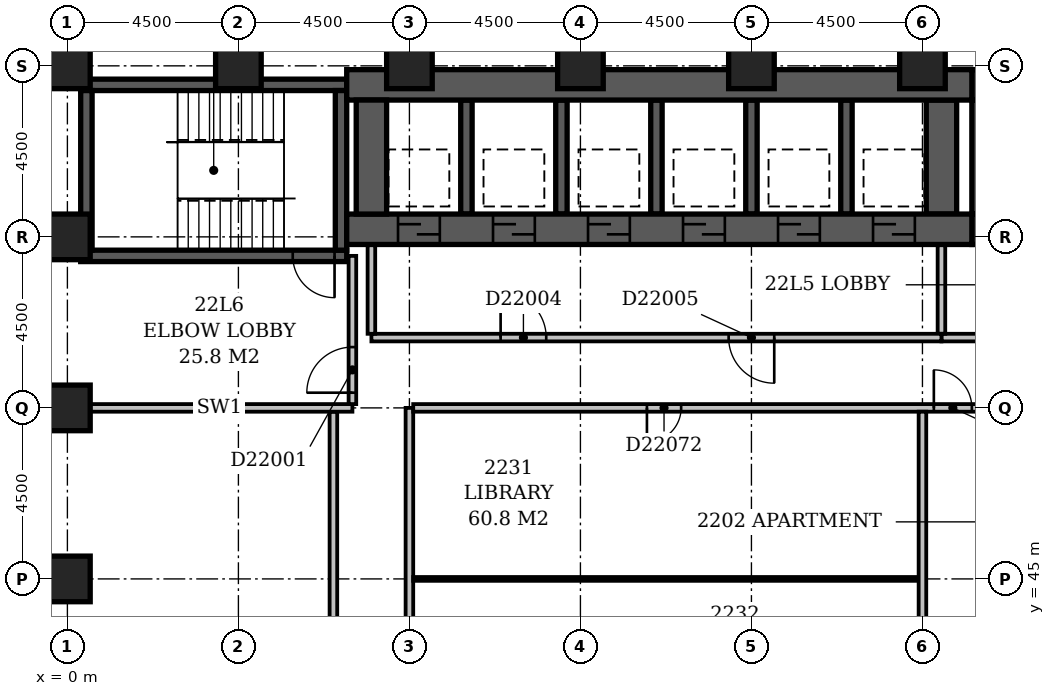
"""IFC4 building model, lengths in metres.
Left out: names, types, materials, properties, quantities, classifications, styles, units other than length and angle.
Written with IfcOpenShell. Run it as: python <this file> out.ifc"""

import sys

from ifc_helpers import new_model, si_unit, direction, frame, frame_2d, origin, origin_2d, place, context, subcontext, project, spatial, rectangle, extrude, element, fill, save


model = new_model("IFC4")
c1 = context("Model", 3, precision=1e-05, world=origin(), true_north=direction((0.0, 1.0)))
c2 = subcontext(c1, "Body", "Model", "MODEL_VIEW")
j1 = project(units=[si_unit("LENGTHUNIT", "METRE"), si_unit("PLANEANGLEUNIT", "RADIAN")], contexts=[c1])
p1 = place(None, origin())
s1 = spatial("IfcSite", under=j1, at=p1, CompositionType="ELEMENT")
p2 = place(p1, origin())
s2 = spatial("IfcBuilding", under=s1, at=p2, CompositionType="ELEMENT")
p3 = place(p2, frame((0.0, 0.0, 90.2)))
s3 = spatial("IfcBuildingStorey", under=s2, at=p3, CompositionType="ELEMENT", Elevation=90.2)
p4 = place(p3, frame((0.35, 53.5, -0.3), z_axis=(0.0, 0.0, 1.0), x_axis=(1.0, 0.0, 0.0)))
e1 = element("IfcWall", 1, at=p4, inside=s3, PredefinedType="SHEAR", context=c2, shape_type="SweptSolid", body=[
    extrude(rectangle(XDim=7.0, YDim=0.3, at=frame_2d((3.5, 0.0))), origin(), (0.0, 0.0, 1.0), 3.6),
])
p5 = place(p4, frame((5.58, 0.0, 0.3)))
e2 = element("IfcOpeningElement", 2, at=p5, cuts=e1, PredefinedType="OPENING", context=c2, shape_type="SweptSolid", body=[
    extrude(rectangle(XDim=1.1, YDim=2.1, at=frame_2d((0.55, 1.05))), frame((0.0, 0.162, 0.0), z_axis=(0.0, -1.0, 0.0), x_axis=(1.0, 0.0, 0.0)), (0.0, 0.0, 1.0), 0.324),
])
p6 = place(p3, frame((0.35, 58.0, -0.3), z_axis=(0.0, 0.0, 1.0), x_axis=(1.0, 0.0, 0.0)))
e3 = element("IfcWall", 3, at=p6, inside=s3, PredefinedType="SHEAR", context=c2, shape_type="SweptSolid", body=[
    extrude(rectangle(XDim=7.0, YDim=0.3, at=frame_2d((3.5, 0.0))), origin(), (0.0, 0.0, 1.0), 3.6),
])
for number, where, z_axis, x_axis in (
    (4, (0.5, 53.65, -0.3), (0.0, 0.0, 1.0), (0.0, 1.0, 0.0)),
    (5, (7.2, 53.65, -0.3), (0.0, 0.0, 1.0), (0.0, 1.0, 0.0)),
):
    element("IfcWall", number, at=place(p3, frame(where, z_axis=z_axis, x_axis=x_axis)), inside=s3, PredefinedType="SHEAR", context=c2, shape_type="SweptSolid", body=[
        extrude(rectangle(XDim=4.2, YDim=0.3, at=frame_2d((2.1, 0.0))), origin(), (0.0, 0.0, 1.0), 3.6),
    ])
p7 = place(p3, frame((7.35, 54.2, -0.3), z_axis=(0.0, 0.0, 1.0), x_axis=(1.0, 0.0, 0.0)))
e6 = element("IfcWall", 6, at=p7, inside=s3, PredefinedType="SHEAR", context=c2, shape_type="SweptSolid", body=[
    extrude(rectangle(XDim=16.45, YDim=0.8, at=frame_2d((8.225, 0.0))), origin(), (0.0, 0.0, 1.0), 3.6),
])
p8 = place(p7, frame((1.35, 0.0, 0.3)))
e7 = element("IfcOpeningElement", 7, at=p8, cuts=e6, PredefinedType="OPENING", context=c2, shape_type="SweptSolid", body=[
    extrude(rectangle(XDim=1.1, YDim=2.1, at=frame_2d((0.55, 1.05))), frame((0.0, 0.412, 0.0), z_axis=(0.0, -1.0, 0.0), x_axis=(1.0, 0.0, 0.0)), (0.0, 0.0, 1.0), 0.824),
])
p9 = place(p7, frame((3.85, 0.0, 0.3)))
e8 = element("IfcOpeningElement", 8, at=p9, cuts=e6, PredefinedType="OPENING", context=c2, shape_type="SweptSolid", body=[
    extrude(rectangle(XDim=1.1, YDim=2.1, at=frame_2d((0.55, 1.05))), frame((0.0, 0.412, 0.0), z_axis=(0.0, -1.0, 0.0), x_axis=(1.0, 0.0, 0.0)), (0.0, 0.0, 1.0), 0.824),
])
p10 = place(p7, frame((6.35, 0.0, 0.3)))
e9 = element("IfcOpeningElement", 9, at=p10, cuts=e6, PredefinedType="OPENING", context=c2, shape_type="SweptSolid", body=[
    extrude(rectangle(XDim=1.1, YDim=2.1, at=frame_2d((0.55, 1.05))), frame((0.0, 0.412, 0.0), z_axis=(0.0, -1.0, 0.0), x_axis=(1.0, 0.0, 0.0)), (0.0, 0.0, 1.0), 0.824),
])
p11 = place(p7, frame((8.85, 0.0, 0.3)))
e10 = element("IfcOpeningElement", 10, at=p11, cuts=e6, PredefinedType="OPENING", context=c2, shape_type="SweptSolid", body=[
    extrude(rectangle(XDim=1.1, YDim=2.1, at=frame_2d((0.55, 1.05))), frame((0.0, 0.412, 0.0), z_axis=(0.0, -1.0, 0.0), x_axis=(1.0, 0.0, 0.0)), (0.0, 0.0, 1.0), 0.824),
])
p12 = place(p7, frame((11.35, 0.0, 0.3)))
e11 = element("IfcOpeningElement", 11, at=p12, cuts=e6, PredefinedType="OPENING", context=c2, shape_type="SweptSolid", body=[
    extrude(rectangle(XDim=1.1, YDim=2.1, at=frame_2d((0.55, 1.05))), frame((0.0, 0.412, 0.0), z_axis=(0.0, -1.0, 0.0), x_axis=(1.0, 0.0, 0.0)), (0.0, 0.0, 1.0), 0.824),
])
p13 = place(p7, frame((13.85, 0.0, 0.3)))
e12 = element("IfcOpeningElement", 12, at=p13, cuts=e6, PredefinedType="OPENING", context=c2, shape_type="SweptSolid", body=[
    extrude(rectangle(XDim=1.1, YDim=2.1, at=frame_2d((0.55, 1.05))), frame((0.0, 0.412, 0.0), z_axis=(0.0, -1.0, 0.0), x_axis=(1.0, 0.0, 0.0)), (0.0, 0.0, 1.0), 0.824),
])
p14 = place(p3, frame((7.35, 58.0, -0.3), z_axis=(0.0, 0.0, 1.0), x_axis=(1.0, 0.0, 0.0)))
e13 = element("IfcWall", 13, at=p14, inside=s3, PredefinedType="SHEAR", context=c2, shape_type="SweptSolid", body=[
    extrude(rectangle(XDim=16.45, YDim=0.8, at=frame_2d((8.225, 0.0))), origin(), (0.0, 0.0, 1.0), 3.6),
])
p15 = place(p3, frame((8.0, 54.6, -0.3), z_axis=(0.0, 0.0, 1.0), x_axis=(0.0, 1.0, 0.0)))
e14 = element("IfcWall", 14, at=p15, inside=s3, PredefinedType="SHEAR", context=c2, shape_type="SweptSolid", body=[
    extrude(rectangle(XDim=3.0, YDim=0.8, at=frame_2d((1.5, 0.0))), origin(), (0.0, 0.0, 1.0), 3.6),
])
for number, where, z_axis, x_axis in (
    (15, (10.5, 54.6, -0.3), (0.0, 0.0, 1.0), (0.0, 1.0, 0.0)),
    (16, (13.0, 54.6, -0.3), (0.0, 0.0, 1.0), (0.0, 1.0, 0.0)),
    (17, (15.5, 54.6, -0.3), (0.0, 0.0, 1.0), (0.0, 1.0, 0.0)),
    (18, (18.0, 54.6, -0.3), (0.0, 0.0, 1.0), (0.0, 1.0, 0.0)),
    (19, (20.5, 54.6, -0.3), (0.0, 0.0, 1.0), (0.0, 1.0, 0.0)),
):
    element("IfcWall", number, at=place(p3, frame(where, z_axis=z_axis, x_axis=x_axis)), inside=s3, PredefinedType="SHEAR", context=c2, shape_type="SweptSolid", body=[
        extrude(rectangle(XDim=3.0, YDim=0.3, at=frame_2d((1.5, 0.0))), origin(), (0.0, 0.0, 1.0), 3.6),
    ])
p16 = place(p3, frame((23.0, 54.6, -0.3), z_axis=(0.0, 0.0, 1.0), x_axis=(0.0, 1.0, 0.0)))
e20 = element("IfcWall", 20, at=p16, inside=s3, PredefinedType="SHEAR", context=c2, shape_type="SweptSolid", body=[
    extrude(rectangle(XDim=3.0, YDim=0.8, at=frame_2d((1.5, 0.0))), origin(), (0.0, 0.0, 1.0), 3.6),
])
p17 = place(p3, frame((23.8, 54.2, -0.3), z_axis=(0.0, 0.0, 1.0), x_axis=(1.0, 0.0, 0.0)))
e21 = element("IfcWall", 21, at=p17, inside=s3, PredefinedType="SHEAR", context=c2, shape_type="SweptSolid", body=[
    extrude(rectangle(XDim=3.3, YDim=0.8, at=frame_2d((1.65, 0.0))), origin(), (0.0, 0.0, 1.0), 3.6),
])
p18 = place(p17, frame((1.1, 0.0, 0.3)))
e22 = element("IfcOpeningElement", 22, at=p18, cuts=e21, PredefinedType="OPENING", context=c2, shape_type="SweptSolid", body=[
    extrude(rectangle(XDim=1.1, YDim=2.1, at=frame_2d((0.55, 1.05))), frame((0.0, 0.412, 0.0), z_axis=(0.0, -1.0, 0.0), x_axis=(1.0, 0.0, 0.0)), (0.0, 0.0, 1.0), 0.824),
])
p19 = place(p3, frame((23.8, 58.0, -0.3), z_axis=(0.0, 0.0, 1.0), x_axis=(1.0, 0.0, 0.0)))
e23 = element("IfcWall", 23, at=p19, inside=s3, PredefinedType="SHEAR", context=c2, shape_type="SweptSolid", body=[
    extrude(rectangle(XDim=3.3, YDim=0.8, at=frame_2d((1.65, 0.0))), origin(), (0.0, 0.0, 1.0), 3.6),
])
p20 = place(p3, frame((24.2, 54.6, -0.3), z_axis=(0.0, 0.0, 1.0), x_axis=(0.0, 1.0, 0.0)))
e24 = element("IfcWall", 24, at=p20, inside=s3, PredefinedType="SHEAR", context=c2, shape_type="SweptSolid", body=[
    extrude(rectangle(XDim=3.0, YDim=0.8, at=frame_2d((1.5, 0.0))), origin(), (0.0, 0.0, 1.0), 3.6),
])
for number, where, z_axis, x_axis in (
    (25, (0.0, 45.0, -0.3), (0.0, 0.0, 1.0), (1.0, 0.0, 0.0)),
    (26, (0.0, 49.5, -0.3), (0.0, 0.0, 1.0), (1.0, 0.0, 0.0)),
    (27, (0.0, 54.0, -0.3), (0.0, 0.0, 1.0), (1.0, 0.0, 0.0)),
    (28, (0.0, 58.5, -0.3), (0.0, 0.0, 1.0), (1.0, 0.0, 0.0)),
    (29, (4.5, 58.5, -0.3), (0.0, 0.0, 1.0), (1.0, 0.0, 0.0)),
    (30, (9.0, 58.5, -0.3), (0.0, 0.0, 1.0), (1.0, 0.0, 0.0)),
    (31, (13.5, 58.5, -0.3), (0.0, 0.0, 1.0), (1.0, 0.0, 0.0)),
    (32, (18.0, 58.5, -0.3), (0.0, 0.0, 1.0), (1.0, 0.0, 0.0)),
    (33, (22.5, 58.5, -0.3), (0.0, 0.0, 1.0), (1.0, 0.0, 0.0)),
):
    element("IfcColumn", number, at=place(p3, frame(where, z_axis=z_axis, x_axis=x_axis)), inside=s3, PredefinedType="COLUMN", context=c2, shape_type="SweptSolid", body=[
        extrude(rectangle(XDim=1.2, YDim=1.2, at=origin_2d()), origin(), (0.0, 0.0, 1.0), 3.6),
    ])
p21 = place(p3, frame((8.0, 51.35, 0.0), z_axis=(0.0, 0.0, 1.0), x_axis=(1.0, 0.0, 0.0)))
e34 = element("IfcWall", 34, at=p21, inside=s3, PredefinedType="PARTITIONING", context=c2, shape_type="SweptSolid", body=[
    extrude(rectangle(XDim=15.0, YDim=0.2, at=frame_2d((7.5, 0.0))), origin(), (0.0, 0.0, 1.0), 3.3),
])
p22 = place(p21, frame((3.4, 0.0, 0.0)))
e35 = element("IfcOpeningElement", 35, at=p22, cuts=e34, PredefinedType="OPENING", context=c2, shape_type="SweptSolid", body=[
    extrude(rectangle(XDim=1.2, YDim=2.1, at=frame_2d((0.6, 1.05))), frame((0.0, 0.112, 0.0), z_axis=(0.0, -1.0, 0.0), x_axis=(1.0, 0.0, 0.0)), (0.0, 0.0, 1.0), 0.224),
])
p23 = place(p21, frame((9.4, 0.0, 0.0)))
e36 = element("IfcOpeningElement", 36, at=p23, cuts=e34, PredefinedType="OPENING", context=c2, shape_type="SweptSolid", body=[
    extrude(rectangle(XDim=1.2, YDim=2.1, at=frame_2d((0.6, 1.05))), frame((0.0, 0.112, 0.0), z_axis=(0.0, -1.0, 0.0), x_axis=(1.0, 0.0, 0.0)), (0.0, 0.0, 1.0), 0.224),
])
for number, where, z_axis, x_axis in (
    (37, (23.0, 51.45, 0.0), (0.0, 0.0, 1.0), (0.0, 1.0, 0.0)),
    (38, (8.0, 51.45, 0.0), (0.0, 0.0, 1.0), (0.0, 1.0, 0.0)),
):
    element("IfcWall", number, at=place(p3, frame(where, z_axis=z_axis, x_axis=x_axis)), inside=s3, PredefinedType="PARTITIONING", context=c2, shape_type="SweptSolid", body=[
        extrude(rectangle(XDim=2.33, YDim=0.2, at=frame_2d((1.165, 0.0))), origin(), (0.0, 0.0, 1.0), 3.3),
    ])
p24 = place(p3, frame((23.0, 51.35, 0.0), z_axis=(0.0, 0.0, 1.0), x_axis=(1.0, 0.0, 0.0)))
e39 = element("IfcWall", 39, at=p24, inside=s3, PredefinedType="PARTITIONING", context=c2, shape_type="SweptSolid", body=[
    extrude(rectangle(XDim=4.8, YDim=0.2, at=frame_2d((2.4, 0.0))), origin(), (0.0, 0.0, 1.0), 3.3),
])
p25 = place(p24, frame((1.65, 0.0, 0.0)))
e40 = element("IfcOpeningElement", 40, at=p25, cuts=e39, PredefinedType="OPENING", context=c2, shape_type="SweptSolid", body=[
    extrude(rectangle(XDim=1.2, YDim=2.1, at=frame_2d((0.6, 1.05))), frame((0.0, 0.112, 0.0), z_axis=(0.0, -1.0, 0.0), x_axis=(1.0, 0.0, 0.0)), (0.0, 0.0, 1.0), 0.224),
])
p26 = place(p3, frame((0.5, 49.5, 0.0), z_axis=(0.0, 0.0, 1.0), x_axis=(1.0, 0.0, 0.0)))
e41 = element("IfcWall", 41, at=p26, inside=s3, PredefinedType="PARTITIONING", context=c2, shape_type="SweptSolid", body=[
    extrude(rectangle(XDim=7.0, YDim=0.2, at=frame_2d((3.5, 0.0))), origin(), (0.0, 0.0, 1.0), 3.3),
])
p27 = place(p3, frame((7.5, 49.6, 0.0), z_axis=(0.0, 0.0, 1.0), x_axis=(0.0, 1.0, 0.0)))
e42 = element("IfcWall", 42, at=p27, inside=s3, PredefinedType="PARTITIONING", context=c2, shape_type="SweptSolid", body=[
    extrude(rectangle(XDim=3.9, YDim=0.2, at=frame_2d((1.95, 0.0))), origin(), (0.0, 0.0, 1.0), 3.3),
])
p28 = place(p27, frame((0.3, 0.0, 0.0)))
e43 = element("IfcOpeningElement", 43, at=p28, cuts=e42, PredefinedType="OPENING", context=c2, shape_type="SweptSolid", body=[
    extrude(rectangle(XDim=1.2, YDim=2.1, at=frame_2d((0.6, 1.05))), frame((0.0, 0.112, 0.0), z_axis=(0.0, -1.0, 0.0), x_axis=(1.0, 0.0, 0.0)), (0.0, 0.0, 1.0), 0.224),
])
p29 = place(p3, frame((9.0, 5.0, 0.0), z_axis=(0.0, 0.0, 1.0), x_axis=(0.0, 1.0, 0.0)))
e44 = element("IfcWall", 44, at=p29, inside=s3, PredefinedType="PARTITIONING", context=c2, shape_type="SweptSolid", body=[
    extrude(rectangle(XDim=44.5, YDim=0.2, at=frame_2d((22.25, 0.0))), origin(), (0.0, 0.0, 1.0), 3.3),
])
p30 = place(p29, frame((28.45, 0.0, 0.0)))
e45 = element("IfcOpeningElement", 45, at=p30, cuts=e44, PredefinedType="OPENING", context=c2, shape_type="SweptSolid", body=[
    extrude(rectangle(XDim=1.0, YDim=2.1, at=frame_2d((0.5, 1.05))), frame((0.0, 0.112, 0.0), z_axis=(0.0, -1.0, 0.0), x_axis=(1.0, 0.0, 0.0)), (0.0, 0.0, 1.0), 0.224),
])
p31 = place(p29, frame((22.8, 0.0, 0.0)))
e46 = element("IfcOpeningElement", 46, at=p31, cuts=e44, PredefinedType="OPENING", context=c2, shape_type="SweptSolid", body=[
    extrude(rectangle(XDim=1.0, YDim=2.1, at=frame_2d((0.5, 1.05))), frame((0.0, 0.112, 0.0), z_axis=(0.0, -1.0, 0.0), x_axis=(1.0, 0.0, 0.0)), (0.0, 0.0, 1.0), 0.224),
])
p32 = place(p29, frame((14.55, 0.0, 0.0)))
e47 = element("IfcOpeningElement", 47, at=p32, cuts=e44, PredefinedType="OPENING", context=c2, shape_type="SweptSolid", body=[
    extrude(rectangle(XDim=1.0, YDim=2.1, at=frame_2d((0.5, 1.05))), frame((0.0, 0.112, 0.0), z_axis=(0.0, -1.0, 0.0), x_axis=(1.0, 0.0, 0.0)), (0.0, 0.0, 1.0), 0.224),
])
p33 = place(p29, frame((9.3, 0.0, 0.0)))
e48 = element("IfcOpeningElement", 48, at=p33, cuts=e44, PredefinedType="OPENING", context=c2, shape_type="SweptSolid", body=[
    extrude(rectangle(XDim=1.0, YDim=2.1, at=frame_2d((0.5, 1.05))), frame((0.0, 0.112, 0.0), z_axis=(0.0, -1.0, 0.0), x_axis=(1.0, 0.0, 0.0)), (0.0, 0.0, 1.0), 0.224),
])
p34 = place(p29, frame((35.0, 0.0, 0.0)))
e49 = element("IfcOpeningElement", 49, at=p34, cuts=e44, PredefinedType="OPENING", context=c2, shape_type="SweptSolid", body=[
    extrude(rectangle(XDim=0.9, YDim=2.1, at=frame_2d((0.45, 1.05))), frame((0.0, 0.112, 0.0), z_axis=(0.0, -1.0, 0.0), x_axis=(1.0, 0.0, 0.0)), (0.0, 0.0, 1.0), 0.224),
])
p35 = place(p29, frame((1.5, 0.0, 0.0)))
e50 = element("IfcOpeningElement", 50, at=p35, cuts=e44, PredefinedType="OPENING", context=c2, shape_type="SweptSolid", body=[
    extrude(rectangle(XDim=0.9, YDim=2.1, at=frame_2d((0.45, 1.05))), frame((0.0, 0.112, 0.0), z_axis=(0.0, -1.0, 0.0), x_axis=(1.0, 0.0, 0.0)), (0.0, 0.0, 1.0), 0.224),
])
p36 = place(p3, frame((7.0, 34.6, 0.0), z_axis=(0.0, 0.0, 1.0), x_axis=(0.0, 1.0, 0.0)))
e51 = element("IfcWall", 51, at=p36, inside=s3, PredefinedType="PARTITIONING", context=c2, shape_type="SweptSolid", body=[
    extrude(rectangle(XDim=14.8, YDim=0.2, at=frame_2d((7.4, 0.0))), origin(), (0.0, 0.0, 1.0), 3.3),
])
p37 = place(p36, frame((6.95, 0.0, 0.0)))
e52 = element("IfcOpeningElement", 52, at=p37, cuts=e51, PredefinedType="OPENING", context=c2, shape_type="SweptSolid", body=[
    extrude(rectangle(XDim=0.9, YDim=2.1, at=frame_2d((0.45, 1.05))), frame((0.0, 0.112, 0.0), z_axis=(0.0, -1.0, 0.0), x_axis=(1.0, 0.0, 0.0)), (0.0, 0.0, 1.0), 0.224),
])
p38 = place(p3, frame((22.5, 36.6, 0.0), z_axis=(0.0, 0.0, 1.0), x_axis=(0.0, 1.0, 0.0)))
e53 = element("IfcWall", 53, at=p38, inside=s3, PredefinedType="PARTITIONING", context=c2, shape_type="SweptSolid", body=[
    extrude(rectangle(XDim=12.8, YDim=0.2, at=frame_2d((6.4, 0.0))), origin(), (0.0, 0.0, 1.0), 3.3),
])
p39 = place(p3, frame((9.1, 45.0, 0.0), z_axis=(0.0, 0.0, 1.0), x_axis=(1.0, 0.0, 0.0)))
e54 = element("IfcWall", 54, at=p39, inside=s3, PredefinedType="PARTITIONING", context=c2, shape_type="SweptSolid", body=[
    extrude(rectangle(XDim=13.3, YDim=0.1, at=frame_2d((6.65, 0.0))), origin(), (0.0, 0.0, 1.0), 3.3),
])
p40 = place(p3, frame((9.1, 49.5, 0.0), z_axis=(0.0, 0.0, 1.0), x_axis=(1.0, 0.0, 0.0)))
e55 = element("IfcWall", 55, at=p40, inside=s3, PredefinedType="PARTITIONING", context=c2, shape_type="SweptSolid", body=[
    extrude(rectangle(XDim=57.8, YDim=0.2, at=frame_2d((28.9, 0.0))), origin(), (0.0, 0.0, 1.0), 3.3),
])
p41 = place(p40, frame((13.7, 0.0, 0.0)))
e56 = element("IfcOpeningElement", 56, at=p41, cuts=e55, PredefinedType="OPENING", context=c2, shape_type="SweptSolid", body=[
    extrude(rectangle(XDim=1.0, YDim=2.1, at=frame_2d((0.5, 1.05))), frame((0.0, 0.112, 0.0), z_axis=(0.0, -1.0, 0.0), x_axis=(1.0, 0.0, 0.0)), (0.0, 0.0, 1.0), 0.224),
])
p42 = place(p40, frame((22.7, 0.0, 0.0)))
e57 = element("IfcOpeningElement", 57, at=p42, cuts=e55, PredefinedType="OPENING", context=c2, shape_type="SweptSolid", body=[
    extrude(rectangle(XDim=1.0, YDim=2.1, at=frame_2d((0.5, 1.05))), frame((0.0, 0.112, 0.0), z_axis=(0.0, -1.0, 0.0), x_axis=(1.0, 0.0, 0.0)), (0.0, 0.0, 1.0), 0.224),
])
p43 = place(p40, frame((38.6, 0.0, 0.0)))
e58 = element("IfcOpeningElement", 58, at=p43, cuts=e55, PredefinedType="OPENING", context=c2, shape_type="SweptSolid", body=[
    extrude(rectangle(XDim=1.0, YDim=2.1, at=frame_2d((0.5, 1.05))), frame((0.0, 0.112, 0.0), z_axis=(0.0, -1.0, 0.0), x_axis=(1.0, 0.0, 0.0)), (0.0, 0.0, 1.0), 0.224),
])
p44 = place(p40, frame((55.45, 0.0, 0.0)))
e59 = element("IfcOpeningElement", 59, at=p44, cuts=e55, PredefinedType="OPENING", context=c2, shape_type="SweptSolid", body=[
    extrude(rectangle(XDim=1.0, YDim=2.1, at=frame_2d((0.5, 1.05))), frame((0.0, 0.112, 0.0), z_axis=(0.0, -1.0, 0.0), x_axis=(1.0, 0.0, 0.0)), (0.0, 0.0, 1.0), 0.224),
])
p45 = place(p40, frame((6.15, 0.0, 0.0)))
e60 = element("IfcOpeningElement", 60, at=p45, cuts=e55, PredefinedType="OPENING", context=c2, shape_type="SweptSolid", body=[
    extrude(rectangle(XDim=0.9, YDim=2.1, at=frame_2d((0.45, 1.05))), frame((0.0, 0.112, 0.0), z_axis=(0.0, -1.0, 0.0), x_axis=(1.0, 0.0, 0.0)), (0.0, 0.0, 1.0), 0.224),
])
p46 = place(p28, origin())
e61 = element("IfcDoor", 61, at=p46, inside=s3, OperationType="SINGLE_SWING_LEFT", PredefinedType="DOOR", context=c2, shape_type="SweptSolid", body=[
    extrude(rectangle(XDim=1.2, YDim=2.1, at=frame_2d((0.6, 1.05))), frame((0.0, 0.025, 0.0), z_axis=(0.0, -1.0, 0.0), x_axis=(1.0, 0.0, 0.0)), (0.0, 0.0, 1.0), 0.05),
])
fill(e43, e61)
p47 = place(p8, origin())
e62 = element("IfcDoor", 62, at=p47, inside=s3, OperationType="SLIDING_TO_LEFT", PredefinedType="DOOR", context=c2, shape_type="SweptSolid", body=[
    extrude(rectangle(XDim=1.1, YDim=2.1, at=frame_2d((0.55, 1.05))), frame((0.0, 0.025, 0.0), z_axis=(0.0, -1.0, 0.0), x_axis=(1.0, 0.0, 0.0)), (0.0, 0.0, 1.0), 0.05),
])
fill(e7, e62)
p48 = place(p9, origin())
e63 = element("IfcDoor", 63, at=p48, inside=s3, OperationType="SLIDING_TO_LEFT", PredefinedType="DOOR", context=c2, shape_type="SweptSolid", body=[
    extrude(rectangle(XDim=1.1, YDim=2.1, at=frame_2d((0.55, 1.05))), frame((0.0, 0.025, 0.0), z_axis=(0.0, -1.0, 0.0), x_axis=(1.0, 0.0, 0.0)), (0.0, 0.0, 1.0), 0.05),
])
fill(e8, e63)
p49 = place(p10, origin())
e64 = element("IfcDoor", 64, at=p49, inside=s3, OperationType="SLIDING_TO_LEFT", PredefinedType="DOOR", context=c2, shape_type="SweptSolid", body=[
    extrude(rectangle(XDim=1.1, YDim=2.1, at=frame_2d((0.55, 1.05))), frame((0.0, 0.025, 0.0), z_axis=(0.0, -1.0, 0.0), x_axis=(1.0, 0.0, 0.0)), (0.0, 0.0, 1.0), 0.05),
])
fill(e9, e64)
p50 = place(p11, origin())
e65 = element("IfcDoor", 65, at=p50, inside=s3, OperationType="SLIDING_TO_LEFT", PredefinedType="DOOR", context=c2, shape_type="SweptSolid", body=[
    extrude(rectangle(XDim=1.1, YDim=2.1, at=frame_2d((0.55, 1.05))), frame((0.0, 0.025, 0.0), z_axis=(0.0, -1.0, 0.0), x_axis=(1.0, 0.0, 0.0)), (0.0, 0.0, 1.0), 0.05),
])
fill(e10, e65)
p51 = place(p12, origin())
e66 = element("IfcDoor", 66, at=p51, inside=s3, OperationType="SLIDING_TO_LEFT", PredefinedType="DOOR", context=c2, shape_type="SweptSolid", body=[
    extrude(rectangle(XDim=1.1, YDim=2.1, at=frame_2d((0.55, 1.05))), frame((0.0, 0.025, 0.0), z_axis=(0.0, -1.0, 0.0), x_axis=(1.0, 0.0, 0.0)), (0.0, 0.0, 1.0), 0.05),
])
fill(e11, e66)
p52 = place(p13, origin())
e67 = element("IfcDoor", 67, at=p52, inside=s3, OperationType="SLIDING_TO_LEFT", PredefinedType="DOOR", context=c2, shape_type="SweptSolid", body=[
    extrude(rectangle(XDim=1.1, YDim=2.1, at=frame_2d((0.55, 1.05))), frame((0.0, 0.025, 0.0), z_axis=(0.0, -1.0, 0.0), x_axis=(1.0, 0.0, 0.0)), (0.0, 0.0, 1.0), 0.05),
])
fill(e12, e67)
p53 = place(p22, origin())
e68 = element("IfcDoor", 68, at=p53, inside=s3, OperationType="SINGLE_SWING_LEFT", PredefinedType="DOOR", context=c2, shape_type="SweptSolid", body=[
    extrude(rectangle(XDim=1.2, YDim=2.1, at=frame_2d((0.6, 1.05))), frame((0.0, 0.025, 0.0), z_axis=(0.0, -1.0, 0.0), x_axis=(1.0, 0.0, 0.0)), (0.0, 0.0, 1.0), 0.05),
])
fill(e35, e68)
p54 = place(p23, origin())
e69 = element("IfcDoor", 69, at=p54, inside=s3, OperationType="SINGLE_SWING_RIGHT", PredefinedType="DOOR", context=c2, shape_type="SweptSolid", body=[
    extrude(rectangle(XDim=1.2, YDim=2.1, at=frame_2d((0.6, 1.05))), frame((0.0, 0.025, 0.0), z_axis=(0.0, -1.0, 0.0), x_axis=(1.0, 0.0, 0.0)), (0.0, 0.0, 1.0), 0.05),
])
fill(e36, e69)
p55 = place(p5, origin())
e70 = element("IfcDoor", 70, at=p55, inside=s3, OperationType="SINGLE_SWING_RIGHT", PredefinedType="DOOR", context=c2, shape_type="SweptSolid", body=[
    extrude(rectangle(XDim=1.1, YDim=2.1, at=frame_2d((0.55, 1.05))), frame((0.0, 0.025, 0.0), z_axis=(0.0, -1.0, 0.0), x_axis=(1.0, 0.0, 0.0)), (0.0, 0.0, 1.0), 0.05),
])
fill(e2, e70)
p56 = place(p41, origin())
e71 = element("IfcDoor", 71, at=p56, inside=s3, OperationType="SINGLE_SWING_LEFT", PredefinedType="DOOR", context=c2, shape_type="SweptSolid", body=[
    extrude(rectangle(XDim=1.0, YDim=2.1, at=frame_2d((0.5, 1.05))), frame((0.0, 0.025, 0.0), z_axis=(0.0, -1.0, 0.0), x_axis=(1.0, 0.0, 0.0)), (0.0, 0.0, 1.0), 0.05),
])
fill(e56, e71)
p57 = place(p45, frame((0.9, 0.0, 0.0), z_axis=(0.0, 0.0, 1.0), x_axis=(-1.0, 0.0, 0.0)))
e72 = element("IfcDoor", 72, at=p57, inside=s3, OperationType="SINGLE_SWING_RIGHT", PredefinedType="DOOR", context=c2, shape_type="SweptSolid", body=[
    extrude(rectangle(XDim=0.9, YDim=2.1, at=frame_2d((0.45, 1.05))), frame((0.0, 0.025, 0.0), z_axis=(0.0, -1.0, 0.0), x_axis=(1.0, 0.0, 0.0)), (0.0, 0.0, 1.0), 0.05),
])
fill(e60, e72)
save(model, sys.argv[1])
